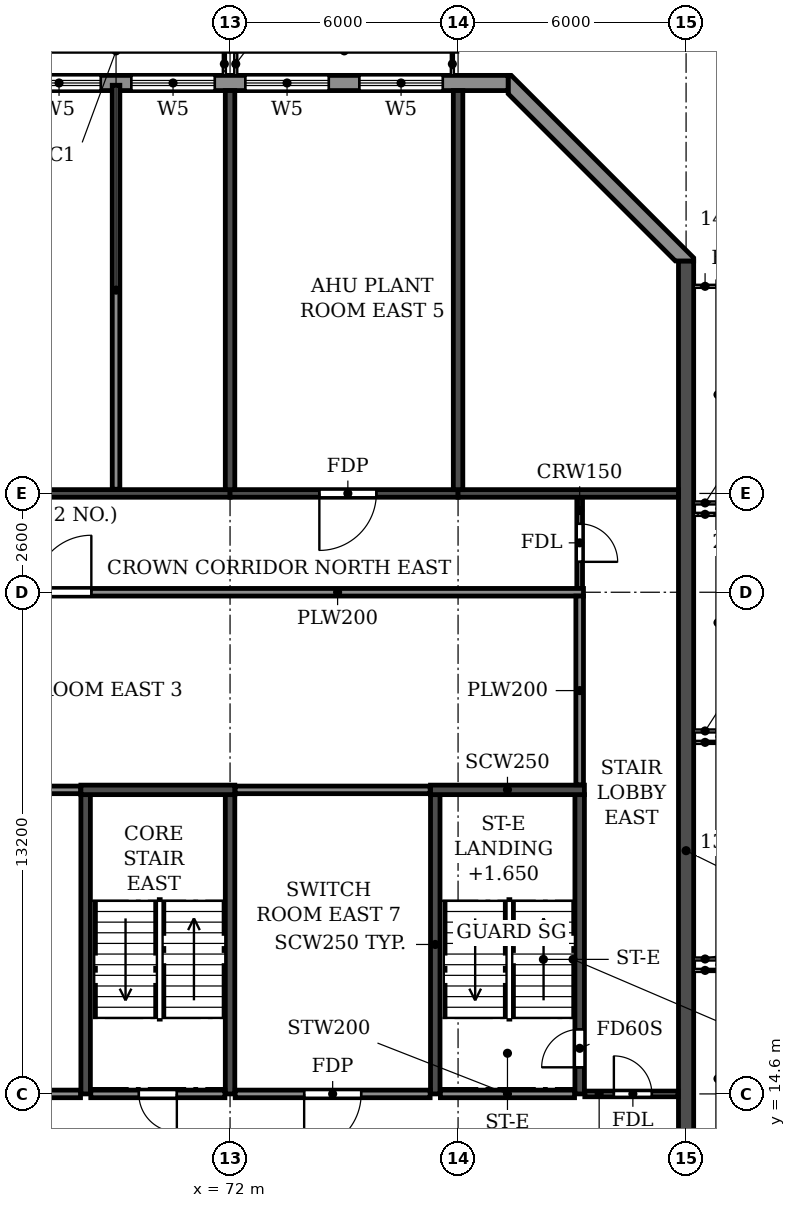
"""IFC4 building model, lengths in metres.
Left out: names, types, materials, properties, quantities, classifications, styles, units other than length and angle.
Written with IfcOpenShell. Run it as: python <this file> out.ifc"""

import sys

from ifc_helpers import new_model, si_unit, direction, frame, frame_2d, origin, place, context, subcontext, project, spatial, polyline, rectangle, outline, extrude, element, fill, save


model = new_model("IFC4")
c1 = context("Model", 3, precision=1e-05, world=origin(), true_north=direction((0.0, 1.0)))
c2 = subcontext(c1, "Body", "Model", "MODEL_VIEW")
j1 = project(units=[si_unit("LENGTHUNIT", "METRE"), si_unit("PLANEANGLEUNIT", "RADIAN")], contexts=[c1])
p1 = place(None, origin())
s1 = spatial("IfcSite", under=j1, at=p1, CompositionType="ELEMENT")
p2 = place(p1, origin())
s2 = spatial("IfcBuilding", under=s1, at=p2, CompositionType="ELEMENT")
p3 = place(p2, frame((0.0, 0.0, 275.7)))
s3 = spatial("IfcBuildingStorey", under=s2, at=p3, CompositionType="ELEMENT", Elevation=275.7)
for number, where, z_axis, x_axis in (
    (1, (72.0, 30.5, 0.0), (0.0, 0.0, 1.0), (0.0, 1.0, 0.0)),
    (2, (78.0, 30.5, 0.0), (0.0, 0.0, 1.0), (0.0, 1.0, 0.0)),
):
    element("IfcWall", number, at=place(p3, frame(where, z_axis=z_axis, x_axis=x_axis)), inside=s3, PredefinedType="SHEAR", context=c2, shape_type="SweptSolid", body=[
        extrude(rectangle(XDim=10.5, YDim=0.25, at=frame_2d((5.25, 0.0))), origin(), (0.0, 0.0, 1.0), 3.05),
    ])
p4 = place(p3, frame((84.0, 4.683, 0.0), z_axis=(0.0, 0.0, 1.0), x_axis=(0.0, 1.0, 0.0)))
e3 = element("IfcWall", 3, at=p4, inside=s3, PredefinedType="SHEAR", context=c2, shape_type="SweptSolid", body=[
    extrude(rectangle(XDim=31.834, YDim=0.4, at=frame_2d((15.917, 0.0))), origin(), (0.0, 0.0, 1.0), 3.05),
])
p5 = place(p3, frame((66.0, 30.4, 0.0), z_axis=(0.0, 0.0, 1.0), x_axis=(1.0, 0.0, 0.0)))
e4 = element("IfcWall", 4, at=p5, inside=s3, PredefinedType="SHEAR", context=c2, shape_type="SweptSolid", body=[
    extrude(rectangle(XDim=6.0, YDim=0.2, at=frame_2d((3.0, 0.0))), origin(), (0.0, 0.0, 1.0), 2.45),
])
p6 = place(p3, frame((72.0, 30.4, 0.0), z_axis=(0.0, 0.0, 1.0), x_axis=(1.0, 0.0, 0.0)))
e5 = element("IfcWall", 5, at=p6, inside=s3, PredefinedType="SHEAR", context=c2, shape_type="SweptSolid", body=[
    extrude(rectangle(XDim=6.0, YDim=0.2, at=frame_2d((3.0, 0.0))), origin(), (0.0, 0.0, 1.0), 2.45),
])
p7 = place(p6, frame((2.35, 0.0, 0.0)))
e6 = element("IfcOpeningElement", 6, at=p7, cuts=e5, PredefinedType="OPENING", context=c2, shape_type="SweptSolid", body=[
    extrude(rectangle(XDim=1.5, YDim=2.1, at=frame_2d((0.75, 1.05))), frame((0.0, 0.11, 0.0), z_axis=(0.0, -1.0, 0.0), x_axis=(1.0, 0.0, 0.0)), (0.0, 0.0, 1.0), 0.22),
])
p8 = place(p3, frame((78.0, 30.4, 0.0), z_axis=(0.0, 0.0, 1.0), x_axis=(1.0, 0.0, 0.0)))
e7 = element("IfcWall", 7, at=p8, inside=s3, PredefinedType="SHEAR", context=c2, shape_type="SweptSolid", body=[
    extrude(rectangle(XDim=5.8, YDim=0.2, at=frame_2d((2.9, 0.0))), origin(), (0.0, 0.0, 1.0), 2.45),
])
p9 = place(p3, frame((77.4, 14.6, 0.0), z_axis=(0.0, 0.0, 1.0), x_axis=(0.0, 1.0, 0.0)))
e8 = element("IfcWall", 8, at=p9, inside=s3, PredefinedType="SOLIDWALL", context=c2, shape_type="SweptSolid", body=[
    extrude(rectangle(XDim=7.875, YDim=0.25, at=frame_2d((3.938, 0.0))), origin(), (0.0, 0.0, 1.0), 3.05),
])
p10 = place(p3, frame((81.2, 14.6, 0.0), z_axis=(0.0, 0.0, 1.0), x_axis=(0.0, 1.0, 0.0)))
e9 = element("IfcWall", 9, at=p10, inside=s3, PredefinedType="SOLIDWALL", context=c2, shape_type="SweptSolid", body=[
    extrude(rectangle(XDim=7.875, YDim=0.25, at=frame_2d((3.938, 0.0))), origin(), (0.0, 0.0, 1.0), 3.05),
])
p11 = place(p10, frame((0.7, 0.0, 0.0)))
e10 = element("IfcOpeningElement", 10, at=p11, cuts=e9, PredefinedType="OPENING", context=c2, shape_type="SweptSolid", body=[
    extrude(rectangle(XDim=1.0, YDim=2.1, at=frame_2d((0.5, 1.05))), frame((0.0, 0.135, 0.0), z_axis=(0.0, -1.0, 0.0), x_axis=(1.0, 0.0, 0.0)), (0.0, 0.0, 1.0), 0.27),
])
p12 = place(p3, frame((77.275, 22.6, 0.0), z_axis=(0.0, 0.0, 1.0), x_axis=(1.0, 0.0, 0.0)))
e11 = element("IfcWall", 11, at=p12, inside=s3, PredefinedType="SOLIDWALL", context=c2, shape_type="SweptSolid", body=[
    extrude(rectangle(XDim=4.05, YDim=0.25, at=frame_2d((2.025, 0.0))), origin(), (0.0, 0.0, 1.0), 3.05),
])
for number, where, z_axis, x_axis in (
    (12, (68.2, 14.6, 0.0), (0.0, 0.0, 1.0), (0.0, 1.0, 0.0)),
    (13, (72.0, 14.6, 0.0), (0.0, 0.0, 1.0), (0.0, 1.0, 0.0)),
):
    element("IfcWall", number, at=place(p3, frame(where, z_axis=z_axis, x_axis=x_axis)), inside=s3, PredefinedType="SOLIDWALL", context=c2, shape_type="SweptSolid", body=[
        extrude(rectangle(XDim=7.875, YDim=0.25, at=frame_2d((3.938, 0.0))), origin(), (0.0, 0.0, 1.0), 3.05),
    ])
p13 = place(p3, frame((68.075, 22.6, 0.0), z_axis=(0.0, 0.0, 1.0), x_axis=(1.0, 0.0, 0.0)))
e14 = element("IfcWall", 14, at=p13, inside=s3, PredefinedType="SOLIDWALL", context=c2, shape_type="SweptSolid", body=[
    extrude(rectangle(XDim=4.05, YDim=0.25, at=frame_2d((2.025, 0.0))), origin(), (0.0, 0.0, 1.0), 3.05),
])
p14 = place(p3, origin())
e15 = element("IfcWall", 15, at=p14, inside=s3, PredefinedType="STANDARD", context=c2, shape_type="SweptSolid", body=[
    extrude(outline(polyline([(84.2, 36.517), (84.2, 36.6), (79.4, 41.4), (79.317, 41.4), (79.317, 40.917), (83.717, 36.517), (84.2, 36.517)])), origin(), (0.0, 0.0, 1.0), 3.05),
])
p15 = place(p3, frame((79.317, 41.2, 0.0), z_axis=(0.0, 0.0, 1.0), x_axis=(-1.0, 0.0, 0.0)))
e16 = element("IfcWall", 16, at=p15, inside=s3, PredefinedType="STANDARD", context=c2, shape_type="SweptSolid", body=[
    extrude(rectangle(XDim=25.517, YDim=0.4, at=frame_2d((12.759, 0.0))), origin(), (0.0, 0.0, 1.0), 3.05),
])
p16 = place(p15, frame((22.717, 0.0, 0.6)))
e17 = element("IfcOpeningElement", 17, at=p16, cuts=e16, PredefinedType="OPENING", context=c2, shape_type="SweptSolid", body=[
    extrude(rectangle(XDim=2.2, YDim=2.4, at=frame_2d((1.1, 1.2))), frame((0.0, 0.21, 0.0), z_axis=(0.0, -1.0, 0.0), x_axis=(1.0, 0.0, 0.0)), (0.0, 0.0, 1.0), 0.42),
])
p17 = place(p15, frame((19.717, 0.0, 0.6)))
e18 = element("IfcOpeningElement", 18, at=p17, cuts=e16, PredefinedType="OPENING", context=c2, shape_type="SweptSolid", body=[
    extrude(rectangle(XDim=2.2, YDim=2.4, at=frame_2d((1.1, 1.2))), frame((0.0, 0.21, 0.0), z_axis=(0.0, -1.0, 0.0), x_axis=(1.0, 0.0, 0.0)), (0.0, 0.0, 1.0), 0.42),
])
p18 = place(p15, frame((16.717, 0.0, 0.6)))
e19 = element("IfcOpeningElement", 19, at=p18, cuts=e16, PredefinedType="OPENING", context=c2, shape_type="SweptSolid", body=[
    extrude(rectangle(XDim=2.2, YDim=2.4, at=frame_2d((1.1, 1.2))), frame((0.0, 0.21, 0.0), z_axis=(0.0, -1.0, 0.0), x_axis=(1.0, 0.0, 0.0)), (0.0, 0.0, 1.0), 0.42),
])
p19 = place(p15, frame((13.717, 0.0, 0.6)))
e20 = element("IfcOpeningElement", 20, at=p19, cuts=e16, PredefinedType="OPENING", context=c2, shape_type="SweptSolid", body=[
    extrude(rectangle(XDim=2.2, YDim=2.4, at=frame_2d((1.1, 1.2))), frame((0.0, 0.21, 0.0), z_axis=(0.0, -1.0, 0.0), x_axis=(1.0, 0.0, 0.0)), (0.0, 0.0, 1.0), 0.42),
])
p20 = place(p15, frame((10.717, 0.0, 0.6)))
e21 = element("IfcOpeningElement", 21, at=p20, cuts=e16, PredefinedType="OPENING", context=c2, shape_type="SweptSolid", body=[
    extrude(rectangle(XDim=2.2, YDim=2.4, at=frame_2d((1.1, 1.2))), frame((0.0, 0.21, 0.0), z_axis=(0.0, -1.0, 0.0), x_axis=(1.0, 0.0, 0.0)), (0.0, 0.0, 1.0), 0.42),
])
p21 = place(p15, frame((7.717, 0.0, 0.6)))
e22 = element("IfcOpeningElement", 22, at=p21, cuts=e16, PredefinedType="OPENING", context=c2, shape_type="SweptSolid", body=[
    extrude(rectangle(XDim=2.2, YDim=2.4, at=frame_2d((1.1, 1.2))), frame((0.0, 0.21, 0.0), z_axis=(0.0, -1.0, 0.0), x_axis=(1.0, 0.0, 0.0)), (0.0, 0.0, 1.0), 0.42),
])
p22 = place(p15, frame((4.717, 0.0, 0.6)))
e23 = element("IfcOpeningElement", 23, at=p22, cuts=e16, PredefinedType="OPENING", context=c2, shape_type="SweptSolid", body=[
    extrude(rectangle(XDim=2.2, YDim=2.4, at=frame_2d((1.1, 1.2))), frame((0.0, 0.21, 0.0), z_axis=(0.0, -1.0, 0.0), x_axis=(1.0, 0.0, 0.0)), (0.0, 0.0, 1.0), 0.42),
])
p23 = place(p15, frame((1.717, 0.0, 0.6)))
e24 = element("IfcOpeningElement", 24, at=p23, cuts=e16, PredefinedType="OPENING", context=c2, shape_type="SweptSolid", body=[
    extrude(rectangle(XDim=2.2, YDim=2.4, at=frame_2d((1.1, 1.2))), frame((0.0, 0.21, 0.0), z_axis=(0.0, -1.0, 0.0), x_axis=(1.0, 0.0, 0.0)), (0.0, 0.0, 1.0), 0.42),
])
p24 = place(p3, frame((81.335, 14.6, 0.0), z_axis=(0.0, 0.0, 1.0), x_axis=(1.0, 0.0, 0.0)))
e25 = element("IfcWall", 25, at=p24, inside=s3, PredefinedType="PARTITIONING", context=c2, shape_type="SweptSolid", body=[
    extrude(rectangle(XDim=2.455, YDim=0.15, at=frame_2d((1.228, 0.0))), origin(), (0.0, 0.0, 1.0), 3.05),
])
p25 = place(p24, frame((0.765, 0.0, 0.0)))
e26 = element("IfcOpeningElement", 26, at=p25, cuts=e25, PredefinedType="OPENING", context=c2, shape_type="SweptSolid", body=[
    extrude(rectangle(XDim=1.0, YDim=2.1, at=frame_2d((0.5, 1.05))), frame((0.0, 0.085, 0.0), z_axis=(0.0, -1.0, 0.0), x_axis=(1.0, 0.0, 0.0)), (0.0, 0.0, 1.0), 0.17),
])
p26 = place(p3, frame((81.2, 27.9, 0.0), z_axis=(0.0, 0.0, 1.0), x_axis=(0.0, 1.0, 0.0)))
e27 = element("IfcWall", 27, at=p26, inside=s3, PredefinedType="PARTITIONING", context=c2, shape_type="SweptSolid", body=[
    extrude(rectangle(XDim=2.39, YDim=0.15, at=frame_2d((1.195, 0.0))), origin(), (0.0, 0.0, 1.0), 3.05),
])
p27 = place(p26, frame((0.7, 0.0, 0.0)))
e28 = element("IfcOpeningElement", 28, at=p27, cuts=e27, PredefinedType="OPENING", context=c2, shape_type="SweptSolid", body=[
    extrude(rectangle(XDim=1.0, YDim=2.1, at=frame_2d((0.5, 1.05))), frame((0.0, 0.085, 0.0), z_axis=(0.0, -1.0, 0.0), x_axis=(1.0, 0.0, 0.0)), (0.0, 0.0, 1.0), 0.17),
])
p28 = place(p3, frame((54.21, 14.6, 0.0), z_axis=(0.0, 0.0, 1.0), x_axis=(1.0, 0.0, 0.0)))
e29 = element("IfcWall", 29, at=p28, inside=s3, PredefinedType="PARTITIONING", context=c2, shape_type="SweptSolid", body=[
    extrude(rectangle(XDim=13.855, YDim=0.2, at=frame_2d((6.927, 0.0))), origin(), (0.0, 0.0, 1.0), 3.05),
])
p29 = place(p28, frame((6.14, 0.0, 0.0)))
e30 = element("IfcOpeningElement", 30, at=p29, cuts=e29, PredefinedType="OPENING", context=c2, shape_type="SweptSolid", body=[
    extrude(rectangle(XDim=1.5, YDim=2.1, at=frame_2d((0.75, 1.05))), frame((0.0, 0.11, 0.0), z_axis=(0.0, -1.0, 0.0), x_axis=(1.0, 0.0, 0.0)), (0.0, 0.0, 1.0), 0.22),
])
p30 = place(p3, frame((72.135, 14.6, 0.0), z_axis=(0.0, 0.0, 1.0), x_axis=(1.0, 0.0, 0.0)))
e31 = element("IfcWall", 31, at=p30, inside=s3, PredefinedType="PARTITIONING", context=c2, shape_type="SweptSolid", body=[
    extrude(rectangle(XDim=5.13, YDim=0.2, at=frame_2d((2.565, 0.0))), origin(), (0.0, 0.0, 1.0), 3.05),
])
p31 = place(p30, frame((1.815, 0.0, 0.0)))
e32 = element("IfcOpeningElement", 32, at=p31, cuts=e31, PredefinedType="OPENING", context=c2, shape_type="SweptSolid", body=[
    extrude(rectangle(XDim=1.5, YDim=2.1, at=frame_2d((0.75, 1.05))), frame((0.0, 0.11, 0.0), z_axis=(0.0, -1.0, 0.0), x_axis=(1.0, 0.0, 0.0)), (0.0, 0.0, 1.0), 0.22),
])
p32 = place(p3, frame((54.21, 22.6, 0.0), z_axis=(0.0, 0.0, 1.0), x_axis=(1.0, 0.0, 0.0)))
e33 = element("IfcWall", 33, at=p32, inside=s3, PredefinedType="PARTITIONING", context=c2, shape_type="SweptSolid", body=[
    extrude(rectangle(XDim=13.855, YDim=0.2, at=frame_2d((6.927, 0.0))), origin(), (0.0, 0.0, 1.0), 3.05),
])
p33 = place(p3, frame((72.135, 22.6, 0.0), z_axis=(0.0, 0.0, 1.0), x_axis=(1.0, 0.0, 0.0)))
e34 = element("IfcWall", 34, at=p33, inside=s3, PredefinedType="PARTITIONING", context=c2, shape_type="SweptSolid", body=[
    extrude(rectangle(XDim=5.13, YDim=0.2, at=frame_2d((2.565, 0.0))), origin(), (0.0, 0.0, 1.0), 3.05),
])
p34 = place(p3, frame((54.21, 27.8, 0.0), z_axis=(0.0, 0.0, 1.0), x_axis=(1.0, 0.0, 0.0)))
e35 = element("IfcWall", 35, at=p34, inside=s3, PredefinedType="PARTITIONING", context=c2, shape_type="SweptSolid", body=[
    extrude(rectangle(XDim=27.09, YDim=0.2, at=frame_2d((13.545, 0.0))), origin(), (0.0, 0.0, 1.0), 3.05),
])
p35 = place(p34, frame((12.64, 0.0, 0.0)))
e36 = element("IfcOpeningElement", 36, at=p35, cuts=e35, PredefinedType="OPENING", context=c2, shape_type="SweptSolid", body=[
    extrude(rectangle(XDim=1.5, YDim=2.1, at=frame_2d((0.75, 1.05))), frame((0.0, 0.11, 0.0), z_axis=(0.0, -1.0, 0.0), x_axis=(1.0, 0.0, 0.0)), (0.0, 0.0, 1.0), 0.22),
])
p36 = place(p3, frame((69.0, 30.51, 0.0), z_axis=(0.0, 0.0, 1.0), x_axis=(0.0, 1.0, 0.0)))
e37 = element("IfcWall", 37, at=p36, inside=s3, PredefinedType="PARTITIONING", context=c2, shape_type="SweptSolid", body=[
    extrude(rectangle(XDim=10.63, YDim=0.2, at=frame_2d((5.315, 0.0))), origin(), (0.0, 0.0, 1.0), 3.05),
])
p37 = place(p3, frame((81.2, 22.735, 0.0), z_axis=(0.0, 0.0, 1.0), x_axis=(0.0, 1.0, 0.0)))
e38 = element("IfcWall", 38, at=p37, inside=s3, PredefinedType="PARTITIONING", context=c2, shape_type="SweptSolid", body=[
    extrude(rectangle(XDim=4.965, YDim=0.2, at=frame_2d((2.482, 0.0))), origin(), (0.0, 0.0, 1.0), 3.05),
])
p38 = place(p3, frame((68.335, 14.6, 0.0), z_axis=(0.0, 0.0, 1.0), x_axis=(1.0, 0.0, 0.0)))
e39 = element("IfcWall", 39, at=p38, inside=s3, PredefinedType="PARTITIONING", context=c2, shape_type="SweptSolid", body=[
    extrude(rectangle(XDim=3.53, YDim=0.2, at=frame_2d((1.765, 0.0))), origin(), (0.0, 0.0, 1.0), 3.05),
])
p39 = place(p38, frame((1.265, 0.0, 0.0)))
e40 = element("IfcOpeningElement", 40, at=p39, cuts=e39, PredefinedType="OPENING", context=c2, shape_type="SweptSolid", body=[
    extrude(rectangle(XDim=1.0, YDim=2.1, at=frame_2d((0.5, 1.05))), frame((0.0, 0.11, 0.0), z_axis=(0.0, -1.0, 0.0), x_axis=(1.0, 0.0, 0.0)), (0.0, 0.0, 1.0), 0.22),
])
p40 = place(p3, frame((77.535, 14.6, 0.0), z_axis=(0.0, 0.0, 1.0), x_axis=(1.0, 0.0, 0.0)))
e41 = element("IfcWall", 41, at=p40, inside=s3, PredefinedType="PARTITIONING", context=c2, shape_type="SweptSolid", body=[
    extrude(rectangle(XDim=3.53, YDim=0.2, at=frame_2d((1.765, 0.0))), origin(), (0.0, 0.0, 1.0), 3.05),
])
p41 = place(p20, origin())
e42 = element("IfcWindow", 42, at=p41, inside=s3, PartitioningType="TRIPLE_PANEL_HORIZONTAL", PredefinedType="WINDOW", context=c2, shape_type="SweptSolid", body=[
    extrude(rectangle(XDim=2.2, YDim=2.4, at=frame_2d((1.1, 1.2))), frame((0.0, 0.03, 0.0), z_axis=(0.0, -1.0, 0.0), x_axis=(1.0, 0.0, 0.0)), (0.0, 0.0, 1.0), 0.06),
])
fill(e21, e42)
p42 = place(p21, origin())
e43 = element("IfcWindow", 43, at=p42, inside=s3, PartitioningType="TRIPLE_PANEL_HORIZONTAL", PredefinedType="WINDOW", context=c2, shape_type="SweptSolid", body=[
    extrude(rectangle(XDim=2.2, YDim=2.4, at=frame_2d((1.1, 1.2))), frame((0.0, 0.03, 0.0), z_axis=(0.0, -1.0, 0.0), x_axis=(1.0, 0.0, 0.0)), (0.0, 0.0, 1.0), 0.06),
])
fill(e22, e43)
p43 = place(p22, origin())
e44 = element("IfcWindow", 44, at=p43, inside=s3, PartitioningType="TRIPLE_PANEL_HORIZONTAL", PredefinedType="WINDOW", context=c2, shape_type="SweptSolid", body=[
    extrude(rectangle(XDim=2.2, YDim=2.4, at=frame_2d((1.1, 1.2))), frame((0.0, 0.03, 0.0), z_axis=(0.0, -1.0, 0.0), x_axis=(1.0, 0.0, 0.0)), (0.0, 0.0, 1.0), 0.06),
])
fill(e23, e44)
p44 = place(p23, origin())
e45 = element("IfcWindow", 45, at=p44, inside=s3, PartitioningType="TRIPLE_PANEL_HORIZONTAL", PredefinedType="WINDOW", context=c2, shape_type="SweptSolid", body=[
    extrude(rectangle(XDim=2.2, YDim=2.4, at=frame_2d((1.1, 1.2))), frame((0.0, 0.03, 0.0), z_axis=(0.0, -1.0, 0.0), x_axis=(1.0, 0.0, 0.0)), (0.0, 0.0, 1.0), 0.06),
])
fill(e24, e45)
p45 = place(p35, origin())
e46 = element("IfcDoor", 46, at=p45, inside=s3, OperationType="DOUBLE_DOOR_SINGLE_SWING", PredefinedType="DOOR", context=c2, shape_type="SweptSolid", body=[
    extrude(rectangle(XDim=1.5, YDim=2.1, at=frame_2d((0.75, 1.05))), frame((0.0, 0.025, 0.0), z_axis=(0.0, -1.0, 0.0), x_axis=(1.0, 0.0, 0.0)), (0.0, 0.0, 1.0), 0.05),
])
fill(e36, e46)
p46 = place(p7, frame((1.5, 0.0, 0.0), z_axis=(0.0, 0.0, 1.0), x_axis=(-1.0, 0.0, 0.0)))
e47 = element("IfcDoor", 47, at=p46, inside=s3, OperationType="DOUBLE_DOOR_SINGLE_SWING", PredefinedType="DOOR", context=c2, shape_type="SweptSolid", body=[
    extrude(rectangle(XDim=1.5, YDim=2.1, at=frame_2d((0.75, 1.05))), frame((0.0, 0.025, 0.0), z_axis=(0.0, -1.0, 0.0), x_axis=(1.0, 0.0, 0.0)), (0.0, 0.0, 1.0), 0.05),
])
fill(e6, e47)
p47 = place(p31, frame((1.5, 0.0, 0.0), z_axis=(0.0, 0.0, 1.0), x_axis=(-1.0, 0.0, 0.0)))
e48 = element("IfcDoor", 48, at=p47, inside=s3, OperationType="DOUBLE_DOOR_SINGLE_SWING", PredefinedType="DOOR", context=c2, shape_type="SweptSolid", body=[
    extrude(rectangle(XDim=1.5, YDim=2.1, at=frame_2d((0.75, 1.05))), frame((0.0, 0.025, 0.0), z_axis=(0.0, -1.0, 0.0), x_axis=(1.0, 0.0, 0.0)), (0.0, 0.0, 1.0), 0.05),
])
fill(e32, e48)
p48 = place(p11, origin())
e49 = element("IfcDoor", 49, at=p48, inside=s3, OperationType="SINGLE_SWING_LEFT", PredefinedType="DOOR", context=c2, shape_type="SweptSolid", body=[
    extrude(rectangle(XDim=1.0, YDim=2.1, at=frame_2d((0.5, 1.05))), frame((0.0, 0.025, 0.0), z_axis=(0.0, -1.0, 0.0), x_axis=(1.0, 0.0, 0.0)), (0.0, 0.0, 1.0), 0.05),
])
fill(e10, e49)
p49 = place(p27, frame((1.0, 0.0, 0.0), z_axis=(0.0, 0.0, 1.0), x_axis=(-1.0, 0.0, 0.0)))
e50 = element("IfcDoor", 50, at=p49, inside=s3, OperationType="SINGLE_SWING_RIGHT", PredefinedType="DOOR", context=c2, shape_type="SweptSolid", body=[
    extrude(rectangle(XDim=1.0, YDim=2.1, at=frame_2d((0.5, 1.05))), frame((0.0, 0.025, 0.0), z_axis=(0.0, -1.0, 0.0), x_axis=(1.0, 0.0, 0.0)), (0.0, 0.0, 1.0), 0.05),
])
fill(e28, e50)
p50 = place(p25, origin())
e51 = element("IfcDoor", 51, at=p50, inside=s3, OperationType="SINGLE_SWING_LEFT", PredefinedType="DOOR", context=c2, shape_type="SweptSolid", body=[
    extrude(rectangle(XDim=1.0, YDim=2.1, at=frame_2d((0.5, 1.05))), frame((0.0, 0.025, 0.0), z_axis=(0.0, -1.0, 0.0), x_axis=(1.0, 0.0, 0.0)), (0.0, 0.0, 1.0), 0.05),
])
fill(e26, e51)
p51 = place(p39, frame((1.0, 0.0, 0.0), z_axis=(0.0, 0.0, 1.0), x_axis=(-1.0, 0.0, 0.0)))
e52 = element("IfcDoor", 52, at=p51, inside=s3, OperationType="SINGLE_SWING_LEFT", PredefinedType="DOOR", context=c2, shape_type="SweptSolid", body=[
    extrude(rectangle(XDim=1.0, YDim=2.1, at=frame_2d((0.5, 1.05))), frame((0.0, 0.025, 0.0), z_axis=(0.0, -1.0, 0.0), x_axis=(1.0, 0.0, 0.0)), (0.0, 0.0, 1.0), 0.05),
])
fill(e40, e52)
save(model, sys.argv[1])
